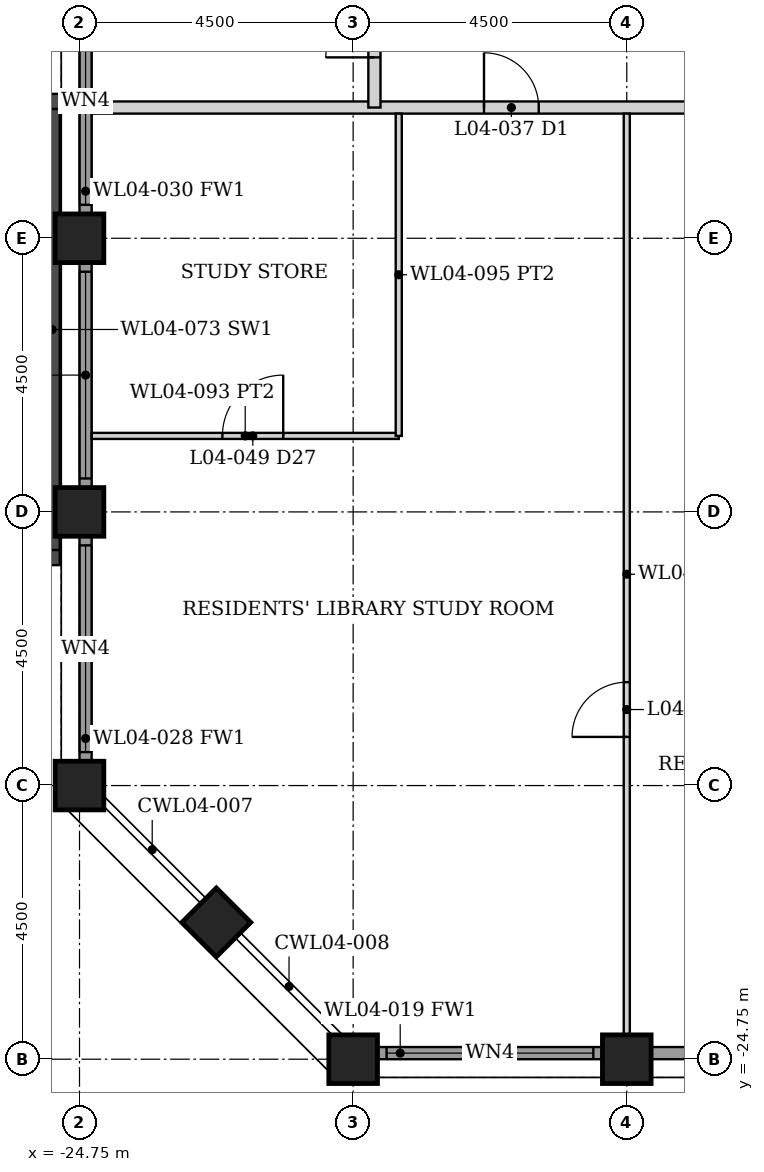
"""IFC4 building model, lengths in metres.
Left out: names, types, materials, properties, quantities, classifications, styles, units other than length and angle.
Written with IfcOpenShell. Run it as: python <this file> out.ifc"""

import sys

from ifc_helpers import new_model, si_unit, direction, frame, frame_2d, origin, origin_2d, place, context, subcontext, project, spatial, rectangle, hollow_rectangle, extrude, element, fill, save


model = new_model("IFC4")
c1 = context("Model", 3, precision=1e-05, world=origin(), true_north=direction((0.0, 1.0)))
c2 = subcontext(c1, "Body", "Model", "MODEL_VIEW")
j1 = project(units=[si_unit("LENGTHUNIT", "METRE"), si_unit("PLANEANGLEUNIT", "RADIAN")], contexts=[c1])
p1 = place(None, origin())
s1 = spatial("IfcSite", under=j1, at=p1, CompositionType="ELEMENT")
p2 = place(p1, origin())
s2 = spatial("IfcBuilding", under=s1, at=p2, CompositionType="ELEMENT")
p3 = place(p2, frame((0.0, 0.0, 21.5)))
s3 = spatial("IfcBuildingStorey", under=s2, at=p3, CompositionType="ELEMENT", Elevation=21.5)
for number, where, z_axis, x_axis in (
    (1, (-20.25, -24.75, 0.0), (0.0, 0.0, 1.0), (0.0, 1.0, 0.0)),
    (2, (-24.75, -20.25, 0.0), (0.0, 0.0, 1.0), (1.0, 0.0, 0.0)),
    (3, (-15.75, -24.75, 0.0), (0.0, 0.0, 1.0), (0.0, 1.0, 0.0)),
    (4, (-24.75, -15.75, 0.0), (0.0, 0.0, 1.0), (1.0, 0.0, 0.0)),
    (5, (-24.75, -11.25, 0.0), (0.0, 0.0, 1.0), (1.0, 0.0, 0.0)),
    (6, (-22.5, -22.5, 0.0), (0.0, 0.0, 1.0), (0.707, 0.707, 0.0)),
):
    element("IfcColumn", number, at=place(p3, frame(where, z_axis=z_axis, x_axis=x_axis)), inside=s3, PredefinedType="COLUMN", context=c2, shape_type="SweptSolid", body=[
        extrude(hollow_rectangle(XDim=0.8, YDim=0.8, WallThickness=0.08, at=origin_2d()), origin(), (0.0, 0.0, 1.0), 5.0),
    ])
p4 = place(p3, frame((-28.625, -16.5, 0.0), z_axis=(0.0, 0.0, 1.0), x_axis=(1.0, 0.0, 0.0)))
e7 = element("IfcWall", 7, at=p4, inside=s3, PredefinedType="SHEAR", context=c2, shape_type="SweptSolid", body=[
    extrude(rectangle(XDim=3.55, YDim=0.25, at=frame_2d((1.775, 0.0))), origin(), (0.0, 0.0, 1.0), 5.0),
])
p5 = place(p3, frame((-28.625, -9.0, 0.0), z_axis=(0.0, 0.0, 1.0), x_axis=(1.0, 0.0, 0.0)))
e8 = element("IfcWall", 8, at=p5, inside=s3, PredefinedType="SHEAR", context=c2, shape_type="SweptSolid", body=[
    extrude(rectangle(XDim=3.55, YDim=0.25, at=frame_2d((1.775, 0.0))), origin(), (0.0, 0.0, 1.0), 5.0),
])
p6 = place(p5, frame((1.875, 0.0, 0.0)))
e9 = element("IfcOpeningElement", 9, at=p6, cuts=e8, PredefinedType="OPENING", context=c2, shape_type="SweptSolid", body=[
    extrude(rectangle(XDim=1.2, YDim=2.2, at=frame_2d((0.6, 1.1))), frame((0.0, 0.135, 0.0), z_axis=(0.0, -1.0, 0.0), x_axis=(1.0, 0.0, 0.0)), (0.0, 0.0, 1.0), 0.27),
])
p7 = place(p3, frame((-25.2, -16.375, 0.0), z_axis=(0.0, 0.0, 1.0), x_axis=(0.0, 1.0, 0.0)))
e10 = element("IfcWall", 10, at=p7, inside=s3, PredefinedType="SHEAR", context=c2, shape_type="SweptSolid", body=[
    extrude(rectangle(XDim=7.25, YDim=0.25, at=frame_2d((3.625, 0.0))), origin(), (0.0, 0.0, 1.0), 5.0),
])
p8 = place(p3, frame((-19.845, -24.65, 0.0), z_axis=(0.0, 0.0, 1.0), x_axis=(1.0, 0.0, 0.0)))
e11 = element("IfcWall", 11, at=p8, inside=s3, PredefinedType="SOLIDWALL", context=c2, shape_type="SweptSolid", body=[
    extrude(rectangle(XDim=3.69, YDim=0.2, at=frame_2d((1.845, 0.0))), origin(), (0.0, 0.0, 1.0), 3.879),
])
p9 = place(p8, frame((0.145, 0.0, 0.3)))
e12 = element("IfcOpeningElement", 12, at=p9, cuts=e11, PredefinedType="OPENING", context=c2, shape_type="SweptSolid", body=[
    extrude(rectangle(XDim=3.4, YDim=3.429, at=frame_2d((1.7, 1.714))), frame((0.0, 0.11, 0.0), z_axis=(0.0, -1.0, 0.0), x_axis=(1.0, 0.0, 0.0)), (0.0, 0.0, 1.0), 0.22),
])
p10 = place(p3, frame((-15.345, -24.65, 0.0), z_axis=(0.0, 0.0, 1.0), x_axis=(1.0, 0.0, 0.0)))
e13 = element("IfcWall", 13, at=p10, inside=s3, PredefinedType="SOLIDWALL", context=c2, shape_type="SweptSolid", body=[
    extrude(rectangle(XDim=3.69, YDim=0.2, at=frame_2d((1.845, 0.0))), origin(), (0.0, 0.0, 1.0), 3.879),
])
p11 = place(p10, frame((0.945, 0.0, 0.0)))
e14 = element("IfcOpeningElement", 14, at=p11, cuts=e13, PredefinedType="OPENING", context=c2, shape_type="SweptSolid", body=[
    extrude(rectangle(XDim=1.8, YDim=2.4, at=frame_2d((0.9, 1.2))), frame((0.0, 0.11, 0.0), z_axis=(0.0, -1.0, 0.0), x_axis=(1.0, 0.0, 0.0)), (0.0, 0.0, 1.0), 0.22),
])
p12 = place(p3, frame((-24.65, -19.845, 0.0), z_axis=(0.0, 0.0, 1.0), x_axis=(0.0, 1.0, 0.0)))
e15 = element("IfcWall", 15, at=p12, inside=s3, PredefinedType="SOLIDWALL", context=c2, shape_type="SweptSolid", body=[
    extrude(rectangle(XDim=3.69, YDim=0.2, at=frame_2d((1.845, 0.0))), origin(), (0.0, 0.0, 1.0), 3.879),
])
p13 = place(p12, frame((0.145, 0.0, 0.3)))
e16 = element("IfcOpeningElement", 16, at=p13, cuts=e15, PredefinedType="OPENING", context=c2, shape_type="SweptSolid", body=[
    extrude(rectangle(XDim=3.4, YDim=3.429, at=frame_2d((1.7, 1.714))), frame((0.0, 0.11, 0.0), z_axis=(0.0, -1.0, 0.0), x_axis=(1.0, 0.0, 0.0)), (0.0, 0.0, 1.0), 0.22),
])
p14 = place(p3, frame((-24.65, -15.345, 0.0), z_axis=(0.0, 0.0, 1.0), x_axis=(0.0, 1.0, 0.0)))
e17 = element("IfcWall", 17, at=p14, inside=s3, PredefinedType="SOLIDWALL", context=c2, shape_type="SweptSolid", body=[
    extrude(rectangle(XDim=3.69, YDim=0.2, at=frame_2d((1.845, 0.0))), origin(), (0.0, 0.0, 1.0), 3.879),
])
p15 = place(p14, frame((0.145, 0.0, 0.3)))
e18 = element("IfcOpeningElement", 18, at=p15, cuts=e17, PredefinedType="OPENING", context=c2, shape_type="SweptSolid", body=[
    extrude(rectangle(XDim=3.4, YDim=3.429, at=frame_2d((1.7, 1.714))), frame((0.0, 0.11, 0.0), z_axis=(0.0, -1.0, 0.0), x_axis=(1.0, 0.0, 0.0)), (0.0, 0.0, 1.0), 0.22),
])
p16 = place(p3, frame((-24.65, -10.845, 0.0), z_axis=(0.0, 0.0, 1.0), x_axis=(0.0, 1.0, 0.0)))
e19 = element("IfcWall", 19, at=p16, inside=s3, PredefinedType="SOLIDWALL", context=c2, shape_type="SweptSolid", body=[
    extrude(rectangle(XDim=3.69, YDim=0.2, at=frame_2d((1.845, 0.0))), origin(), (0.0, 0.0, 1.0), 3.879),
])
p17 = place(p16, frame((0.145, 0.0, 0.3)))
e20 = element("IfcOpeningElement", 20, at=p17, cuts=e19, PredefinedType="OPENING", context=c2, shape_type="SweptSolid", body=[
    extrude(rectangle(XDim=3.4, YDim=3.429, at=frame_2d((1.7, 1.714))), frame((0.0, 0.11, 0.0), z_axis=(0.0, -1.0, 0.0), x_axis=(1.0, 0.0, 0.0)), (0.0, 0.0, 1.0), 0.22),
])
p18 = place(p3, frame((-24.55, -9.1, 0.0), z_axis=(0.0, 0.0, 1.0), x_axis=(1.0, 0.0, 0.0)))
e21 = element("IfcWall", 21, at=p18, inside=s3, PredefinedType="PARTITIONING", context=c2, shape_type="SweptSolid", body=[
    extrude(rectangle(XDim=49.1, YDim=0.2, at=frame_2d((24.55, 0.0))), origin(), (0.0, 0.0, 1.0), 3.873),
])
p19 = place(p18, frame((6.452, 0.0, 0.0)))
e22 = element("IfcOpeningElement", 22, at=p19, cuts=e21, PredefinedType="OPENING", context=c2, shape_type="SweptSolid", body=[
    extrude(rectangle(XDim=0.9, YDim=2.1, at=frame_2d((0.45, 1.05))), frame((0.0, 0.11, 0.0), z_axis=(0.0, -1.0, 0.0), x_axis=(1.0, 0.0, 0.0)), (0.0, 0.0, 1.0), 0.22),
])
p20 = place(p18, frame((12.85, 0.0, 0.0)))
e23 = element("IfcOpeningElement", 23, at=p20, cuts=e21, PredefinedType="OPENING", context=c2, shape_type="SweptSolid", body=[
    extrude(rectangle(XDim=0.9, YDim=2.1, at=frame_2d((0.45, 1.05))), frame((0.0, 0.11, 0.0), z_axis=(0.0, -1.0, 0.0), x_axis=(1.0, 0.0, 0.0)), (0.0, 0.0, 1.0), 0.22),
])
p21 = place(p18, frame((20.934, 0.0, 0.0)))
e24 = element("IfcOpeningElement", 24, at=p21, cuts=e21, PredefinedType="OPENING", context=c2, shape_type="SweptSolid", body=[
    extrude(rectangle(XDim=0.9, YDim=2.1, at=frame_2d((0.45, 1.05))), frame((0.0, 0.11, 0.0), z_axis=(0.0, -1.0, 0.0), x_axis=(1.0, 0.0, 0.0)), (0.0, 0.0, 1.0), 0.22),
])
p22 = place(p18, frame((18.425, 0.0, 0.0)))
e25 = element("IfcOpeningElement", 25, at=p22, cuts=e21, PredefinedType="OPENING", context=c2, shape_type="SweptSolid", body=[
    extrude(rectangle(XDim=1.5, YDim=2.1, at=frame_2d((0.75, 1.05))), frame((0.0, 0.11, 0.0), z_axis=(0.0, -1.0, 0.0), x_axis=(1.0, 0.0, 0.0)), (0.0, 0.0, 1.0), 0.22),
])
p23 = place(p18, frame((30.18, 0.0, 0.0)))
e26 = element("IfcOpeningElement", 26, at=p23, cuts=e21, PredefinedType="OPENING", context=c2, shape_type="SweptSolid", body=[
    extrude(rectangle(XDim=0.9, YDim=2.1, at=frame_2d((0.45, 1.05))), frame((0.0, 0.11, 0.0), z_axis=(0.0, -1.0, 0.0), x_axis=(1.0, 0.0, 0.0)), (0.0, 0.0, 1.0), 0.22),
])
p24 = place(p18, frame((23.3, 0.0, 0.0)))
e27 = element("IfcOpeningElement", 27, at=p24, cuts=e21, PredefinedType="OPENING", context=c2, shape_type="SweptSolid", body=[
    extrude(rectangle(XDim=1.0, YDim=2.1, at=frame_2d((0.5, 1.05))), frame((0.0, 0.11, 0.0), z_axis=(0.0, -1.0, 0.0), x_axis=(1.0, 0.0, 0.0)), (0.0, 0.0, 1.0), 0.22),
])
p25 = place(p18, frame((26.15, 0.0, 0.0)))
e28 = element("IfcOpeningElement", 28, at=p25, cuts=e21, PredefinedType="OPENING", context=c2, shape_type="SweptSolid", body=[
    extrude(rectangle(XDim=0.8, YDim=2.1, at=frame_2d((0.4, 1.05))), frame((0.0, 0.11, 0.0), z_axis=(0.0, -1.0, 0.0), x_axis=(1.0, 0.0, 0.0)), (0.0, 0.0, 1.0), 0.22),
])
p26 = place(p18, frame((28.4, 0.0, 0.0)))
e29 = element("IfcOpeningElement", 29, at=p26, cuts=e21, PredefinedType="OPENING", context=c2, shape_type="SweptSolid", body=[
    extrude(rectangle(XDim=1.0, YDim=2.1, at=frame_2d((0.5, 1.05))), frame((0.0, 0.11, 0.0), z_axis=(0.0, -1.0, 0.0), x_axis=(1.0, 0.0, 0.0)), (0.0, 0.0, 1.0), 0.22),
])
p27 = place(p18, frame((33.05, 0.0, 0.0)))
e30 = element("IfcOpeningElement", 30, at=p27, cuts=e21, PredefinedType="OPENING", context=c2, shape_type="SweptSolid", body=[
    extrude(rectangle(XDim=1.0, YDim=2.1, at=frame_2d((0.5, 1.05))), frame((0.0, 0.11, 0.0), z_axis=(0.0, -1.0, 0.0), x_axis=(1.0, 0.0, 0.0)), (0.0, 0.0, 1.0), 0.22),
])
p28 = place(p18, frame((37.625, 0.0, 0.0)))
e31 = element("IfcOpeningElement", 31, at=p28, cuts=e21, PredefinedType="OPENING", context=c2, shape_type="SweptSolid", body=[
    extrude(rectangle(XDim=0.9, YDim=2.1, at=frame_2d((0.45, 1.05))), frame((0.0, 0.11, 0.0), z_axis=(0.0, -1.0, 0.0), x_axis=(1.0, 0.0, 0.0)), (0.0, 0.0, 1.0), 0.22),
])
p29 = place(p18, frame((40.8, 0.0, 0.0)))
e32 = element("IfcOpeningElement", 32, at=p29, cuts=e21, PredefinedType="OPENING", context=c2, shape_type="SweptSolid", body=[
    extrude(rectangle(XDim=1.0, YDim=2.1, at=frame_2d((0.5, 1.05))), frame((0.0, 0.11, 0.0), z_axis=(0.0, -1.0, 0.0), x_axis=(1.0, 0.0, 0.0)), (0.0, 0.0, 1.0), 0.22),
])
p30 = place(p18, frame((42.8, 0.0, 0.0)))
e33 = element("IfcOpeningElement", 33, at=p30, cuts=e21, PredefinedType="OPENING", context=c2, shape_type="SweptSolid", body=[
    extrude(rectangle(XDim=1.0, YDim=2.1, at=frame_2d((0.5, 1.05))), frame((0.0, 0.11, 0.0), z_axis=(0.0, -1.0, 0.0), x_axis=(1.0, 0.0, 0.0)), (0.0, 0.0, 1.0), 0.22),
])
p31 = place(p3, frame((-19.9, -9.1, 0.0), z_axis=(0.0, 0.0, 1.0), x_axis=(0.0, 1.0, 0.0)))
e34 = element("IfcWall", 34, at=p31, inside=s3, PredefinedType="PARTITIONING", context=c2, shape_type="SweptSolid", body=[
    extrude(rectangle(XDim=18.2, YDim=0.2, at=frame_2d((9.1, 0.0))), origin(), (0.0, 0.0, 1.0), 3.873),
])
p32 = place(p31, frame((0.825, 0.0, 0.0)))
e35 = element("IfcOpeningElement", 35, at=p32, cuts=e34, PredefinedType="OPENING", context=c2, shape_type="SweptSolid", body=[
    extrude(rectangle(XDim=0.8, YDim=2.1, at=frame_2d((0.4, 1.05))), frame((0.0, 0.11, 0.0), z_axis=(0.0, -1.0, 0.0), x_axis=(1.0, 0.0, 0.0)), (0.0, 0.0, 1.0), 0.22),
])
p33 = place(p31, frame((6.4, 0.0, 0.0)))
e36 = element("IfcOpeningElement", 36, at=p33, cuts=e34, PredefinedType="OPENING", context=c2, shape_type="SweptSolid", body=[
    extrude(rectangle(XDim=0.9, YDim=2.1, at=frame_2d((0.45, 1.05))), frame((0.0, 0.11, 0.0), z_axis=(0.0, -1.0, 0.0), x_axis=(1.0, 0.0, 0.0)), (0.0, 0.0, 1.0), 0.22),
])
p34 = place(p31, frame((14.275, 0.0, 0.0)))
e37 = element("IfcOpeningElement", 37, at=p34, cuts=e34, PredefinedType="OPENING", context=c2, shape_type="SweptSolid", body=[
    extrude(rectangle(XDim=0.9, YDim=2.1, at=frame_2d((0.45, 1.05))), frame((0.0, 0.11, 0.0), z_axis=(0.0, -1.0, 0.0), x_axis=(1.0, 0.0, 0.0)), (0.0, 0.0, 1.0), 0.22),
])
p35 = place(p3, frame((-24.55, -14.5, 0.0), z_axis=(0.0, 0.0, 1.0), x_axis=(1.0, 0.0, 0.0)))
e38 = element("IfcWall", 38, at=p35, inside=s3, PredefinedType="PARTITIONING", context=c2, shape_type="SweptSolid", body=[
    extrude(rectangle(XDim=5.05, YDim=0.1, at=frame_2d((2.525, 0.0))), origin(), (0.0, 0.0, 1.0), 3.873),
])
p36 = place(p35, frame((2.15, 0.0, 0.0)))
e39 = element("IfcOpeningElement", 39, at=p36, cuts=e38, PredefinedType="OPENING", context=c2, shape_type="SweptSolid", body=[
    extrude(rectangle(XDim=1.0, YDim=2.1, at=frame_2d((0.5, 1.05))), frame((0.0, 0.06, 0.0), z_axis=(0.0, -1.0, 0.0), x_axis=(1.0, 0.0, 0.0)), (0.0, 0.0, 1.0), 0.12),
])
p37 = place(p3, frame((-19.5, -14.5, 0.0), z_axis=(0.0, 0.0, 1.0), x_axis=(0.0, 1.0, 0.0)))
e40 = element("IfcWall", 40, at=p37, inside=s3, PredefinedType="PARTITIONING", context=c2, shape_type="SweptSolid", body=[
    extrude(rectangle(XDim=5.3, YDim=0.1, at=frame_2d((2.65, 0.0))), origin(), (0.0, 0.0, 1.0), 3.873),
])
p38 = place(p3, frame((-15.75, -24.35, 0.0), z_axis=(0.0, 0.0, 1.0), x_axis=(0.0, 1.0, 0.0)))
e41 = element("IfcWall", 41, at=p38, inside=s3, PredefinedType="PARTITIONING", context=c2, shape_type="SweptSolid", body=[
    extrude(rectangle(XDim=15.15, YDim=0.1, at=frame_2d((7.575, 0.0))), origin(), (0.0, 0.0, 1.0), 3.873),
])
p39 = place(p38, frame((4.9, 0.0, 0.0)))
e42 = element("IfcOpeningElement", 42, at=p39, cuts=e41, PredefinedType="OPENING", context=c2, shape_type="SweptSolid", body=[
    extrude(rectangle(XDim=0.9, YDim=2.1, at=frame_2d((0.45, 1.05))), frame((0.0, 0.06, 0.0), z_axis=(0.0, -1.0, 0.0), x_axis=(1.0, 0.0, 0.0)), (0.0, 0.0, 1.0), 0.12),
])
p40 = place(p9, origin())
e43 = element("IfcWindow", 43, at=p40, inside=s3, PartitioningType="SINGLE_PANEL", PredefinedType="WINDOW", context=c2, shape_type="SweptSolid", body=[
    extrude(rectangle(XDim=3.4, YDim=3.429, at=frame_2d((1.7, 1.714))), frame((0.0, 0.03, 0.0), z_axis=(0.0, -1.0, 0.0), x_axis=(1.0, 0.0, 0.0)), (0.0, 0.0, 1.0), 0.06),
])
fill(e12, e43)
p41 = place(p13, origin())
e44 = element("IfcWindow", 44, at=p41, inside=s3, PartitioningType="SINGLE_PANEL", PredefinedType="WINDOW", context=c2, shape_type="SweptSolid", body=[
    extrude(rectangle(XDim=3.4, YDim=3.429, at=frame_2d((1.7, 1.714))), frame((0.0, 0.03, 0.0), z_axis=(0.0, -1.0, 0.0), x_axis=(1.0, 0.0, 0.0)), (0.0, 0.0, 1.0), 0.06),
])
fill(e16, e44)
p42 = place(p15, origin())
e45 = element("IfcWindow", 45, at=p42, inside=s3, PartitioningType="SINGLE_PANEL", PredefinedType="WINDOW", context=c2, shape_type="SweptSolid", body=[
    extrude(rectangle(XDim=3.4, YDim=3.429, at=frame_2d((1.7, 1.714))), frame((0.0, 0.03, 0.0), z_axis=(0.0, -1.0, 0.0), x_axis=(1.0, 0.0, 0.0)), (0.0, 0.0, 1.0), 0.06),
])
fill(e18, e45)
p43 = place(p17, origin())
e46 = element("IfcWindow", 46, at=p43, inside=s3, PartitioningType="SINGLE_PANEL", PredefinedType="WINDOW", context=c2, shape_type="SweptSolid", body=[
    extrude(rectangle(XDim=3.4, YDim=3.429, at=frame_2d((1.7, 1.714))), frame((0.0, 0.03, 0.0), z_axis=(0.0, -1.0, 0.0), x_axis=(1.0, 0.0, 0.0)), (0.0, 0.0, 1.0), 0.06),
])
fill(e20, e46)
p44 = place(p19, origin())
e47 = element("IfcDoor", 47, at=p44, inside=s3, OperationType="SINGLE_SWING_LEFT", PredefinedType="DOOR", context=c2, shape_type="SweptSolid", body=[
    extrude(rectangle(XDim=0.9, YDim=2.1, at=frame_2d((0.45, 1.05))), frame((0.0, 0.025, 0.0), z_axis=(0.0, -1.0, 0.0), x_axis=(1.0, 0.0, 0.0)), (0.0, 0.0, 1.0), 0.05),
])
fill(e22, e47)
p45 = place(p36, origin())
e48 = element("IfcDoor", 48, at=p45, inside=s3, OperationType="SINGLE_SWING_RIGHT", PredefinedType="DOOR", context=c2, shape_type="SweptSolid", body=[
    extrude(rectangle(XDim=1.0, YDim=2.1, at=frame_2d((0.5, 1.05))), frame((0.0, 0.025, 0.0), z_axis=(0.0, -1.0, 0.0), x_axis=(1.0, 0.0, 0.0)), (0.0, 0.0, 1.0), 0.05),
])
fill(e39, e48)
p46 = place(p39, origin())
e49 = element("IfcDoor", 49, at=p46, inside=s3, OperationType="SINGLE_SWING_LEFT", PredefinedType="DOOR", context=c2, shape_type="SweptSolid", body=[
    extrude(rectangle(XDim=0.9, YDim=2.1, at=frame_2d((0.45, 1.05))), frame((0.0, 0.025, 0.0), z_axis=(0.0, -1.0, 0.0), x_axis=(1.0, 0.0, 0.0)), (0.0, 0.0, 1.0), 0.05),
])
fill(e42, e49)
p47 = place(p32, origin())
e50 = element("IfcDoor", 50, at=p47, inside=s3, OperationType="SINGLE_SWING_LEFT", PredefinedType="DOOR", context=c2, shape_type="SweptSolid", body=[
    extrude(rectangle(XDim=0.8, YDim=2.1, at=frame_2d((0.4, 1.05))), frame((0.0, 0.025, 0.0), z_axis=(0.0, -1.0, 0.0), x_axis=(1.0, 0.0, 0.0)), (0.0, 0.0, 1.0), 0.05),
])
fill(e35, e50)
save(model, sys.argv[1])
